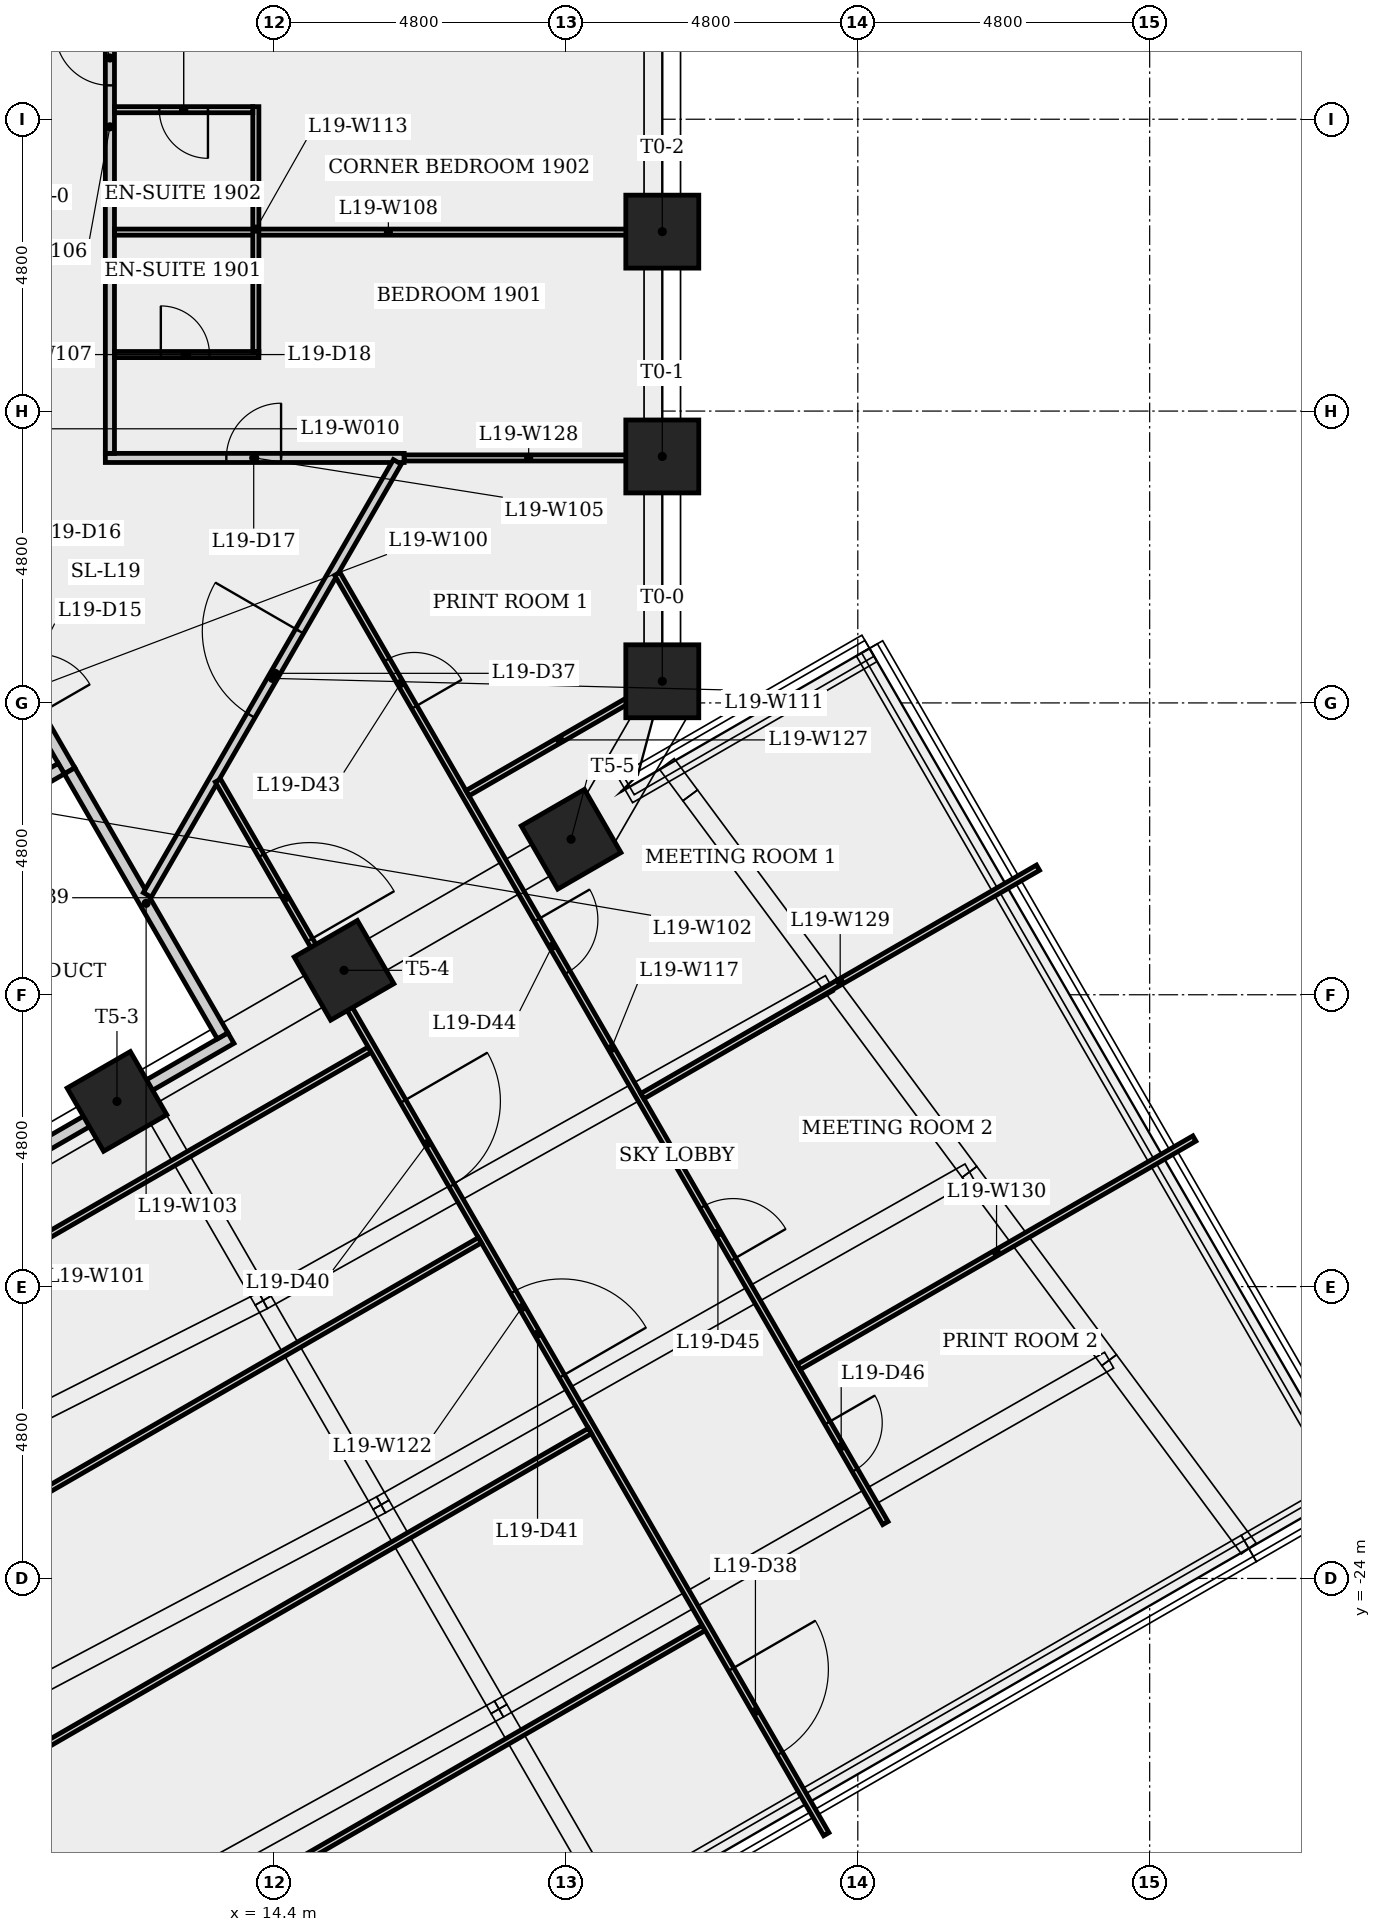
"""IFC4 building model, lengths in metres.
Left out: names, types, materials, properties, quantities, classifications, styles, units other than length and angle.
Written with IfcOpenShell. Run it as: python <this file> out.ifc"""

import sys

from ifc_helpers import new_model, si_unit, direction, frame, frame_2d, origin, origin_2d, place, context, subcontext, project, spatial, rectangle, extrude, element, fill, save


model = new_model("IFC4")
c1 = context("Model", 3, precision=1e-05, world=origin(), true_north=direction((0.0, 1.0)))
c2 = subcontext(c1, "Body", "Model", "MODEL_VIEW")
j1 = project(units=[si_unit("LENGTHUNIT", "METRE"), si_unit("PLANEANGLEUNIT", "RADIAN")], contexts=[c1])
p1 = place(None, origin())
s1 = spatial("IfcSite", under=j1, at=p1, CompositionType="ELEMENT")
p2 = place(p1, origin())
s2 = spatial("IfcBuilding", under=s1, at=p2, CompositionType="ELEMENT")
p3 = place(p2, frame((0.0, 0.0, 74.3)))
s3 = spatial("IfcBuildingStorey", under=s2, at=p3, CompositionType="ELEMENT", Elevation=74.3)
for number, where, z_axis, x_axis in (
    (1, (20.785, -9.244, 0.0), (0.0, 0.0, 1.0), (1.0, 0.0, 0.0)),
    (2, (20.785, -5.546, 0.0), (0.0, 0.0, 1.0), (1.0, 0.0, 0.0)),
    (3, (20.785, -1.849, 0.0), (0.0, 0.0, 1.0), (1.0, 0.0, 0.0)),
    (4, (11.816, -16.154, 0.0), (0.0, 0.0, 1.0), (0.5, -0.866, 0.0)),
    (5, (15.55, -13.998, 0.0), (0.0, 0.0, 1.0), (0.5, -0.866, 0.0)),
    (6, (19.285, -11.842, 0.0), (0.0, 0.0, 1.0), (0.5, -0.866, 0.0)),
):
    element("IfcColumn", number, at=place(p3, frame(where, z_axis=z_axis, x_axis=x_axis)), inside=s3, PredefinedType="COLUMN", context=c2, shape_type="SweptSolid", body=[
        extrude(rectangle(XDim=1.2, YDim=1.2, at=origin_2d()), origin(), (0.0, 0.0, 1.0), 4.0),
    ])
p4 = place(p3, frame((-2.938, -38.904, 0.0), z_axis=(0.0, 0.0, 1.0), x_axis=(0.866026157323, 0.49999869483, 0.0)))
e7 = element("IfcWall", 7, at=p4, inside=s3, PredefinedType="PARTITIONING", context=c2, shape_type="SweptSolid", body=[
    extrude(rectangle(XDim=28.179, YDim=0.1, at=frame_2d((14.089, 0.0))), origin(), (0.0, 0.0, 1.0), 3.6),
])
p5 = place(p4, frame((13.662, 0.0, 0.0)))
e8 = element("IfcOpeningElement", 8, at=p5, cuts=e7, PredefinedType="OPENING", context=c2, shape_type="SweptSolid", body=[
    extrude(rectangle(XDim=1.6, YDim=2.1, at=frame_2d((0.8, 1.05))), frame((0.0, 0.06, 0.0), z_axis=(0.0, -1.0, 0.0), x_axis=(1.0, 0.0, 0.0)), (0.0, 0.0, 1.0), 0.12),
])
p6 = place(p3, frame((9.537, -8.119, 0.0), z_axis=(0.0, 0.0, 1.0), x_axis=(0.499990139034, -0.866031096941, 0.0)))
e9 = element("IfcWall", 9, at=p6, inside=s3, PredefinedType="PARTITIONING", context=c2, shape_type="SweptSolid", body=[
    extrude(rectangle(XDim=3.0, YDim=0.2, at=frame_2d((1.5, 0.0))), origin(), (0.0, 0.0, 1.0), 3.6),
])
p7 = place(p6, frame((0.935, 0.0, 0.0)))
e10 = element("IfcOpeningElement", 10, at=p7, cuts=e9, PredefinedType="OPENING", context=c2, shape_type="SweptSolid", body=[
    extrude(rectangle(XDim=1.0, YDim=2.1, at=frame_2d((0.5, 1.05))), frame((0.0, 0.11, 0.0), z_axis=(0.0, -1.0, 0.0), x_axis=(1.0, 0.0, 0.0)), (0.0, 0.0, 1.0), 0.22),
])
p8 = place(p3, frame((5.896, -19.612, 0.0), z_axis=(0.0, 0.0, 1.0), x_axis=(0.866024315419, 0.5000018851, 0.0)))
e11 = element("IfcWall", 11, at=p8, inside=s3, PredefinedType="PLUMBINGWALL", context=c2, shape_type="SweptSolid", body=[
    extrude(rectangle(XDim=9.0, YDim=0.2, at=frame_2d((4.5, 0.0))), origin(), (0.0, 0.0, 1.0), 2.675),
])
p9 = place(p3, frame((10.901, -10.681, 0.0), z_axis=(0.0, 0.0, 1.0), x_axis=(-0.866007538022, -0.500030943131, 0.0)))
e12 = element("IfcWall", 12, at=p9, inside=s3, PredefinedType="PLUMBINGWALL", context=c2, shape_type="SweptSolid", body=[
    extrude(rectangle(XDim=2.375, YDim=0.2, at=frame_2d((1.188, 0.0))), origin(), (0.0, 0.0, 1.0), 3.6),
])
p10 = place(p3, frame((11.037, -10.717, 0.0), z_axis=(0.0, 0.0, 1.0), x_axis=(0.500005202617, -0.866022400031, 0.0)))
e13 = element("IfcWall", 13, at=p10, inside=s3, PredefinedType="PLUMBINGWALL", context=c2, shape_type="SweptSolid", body=[
    extrude(rectangle(XDim=5.033, YDim=0.2, at=frame_2d((2.516, 0.0))), origin(), (0.0, 0.0, 1.0), 3.6),
])
p11 = place(p3, frame((11.625, -5.571, 0.0), z_axis=(0.0, 0.0, 1.0), x_axis=(1.0, 0.0, 0.0)))
e14 = element("IfcWall", 14, at=p11, inside=s3, PredefinedType="PARTITIONING", context=c2, shape_type="SweptSolid", body=[
    extrude(rectangle(XDim=4.915, YDim=0.15, at=frame_2d((2.457, 0.0))), origin(), (0.0, 0.0, 1.0), 3.6),
])
p12 = place(p11, frame((1.99, 0.0, 0.0)))
e15 = element("IfcOpeningElement", 15, at=p12, cuts=e14, PredefinedType="OPENING", context=c2, shape_type="SweptSolid", body=[
    extrude(rectangle(XDim=0.9, YDim=2.1, at=frame_2d((0.45, 1.05))), frame((0.0, 0.085, 0.0), z_axis=(0.0, -1.0, 0.0), x_axis=(1.0, 0.0, 0.0)), (0.0, 0.0, 1.0), 0.17),
])
p13 = place(p3, frame((11.7, -5.496, 0.0), z_axis=(0.0, 0.0, 1.0), x_axis=(0.0, 1.0, 0.0)))
e16 = element("IfcWall", 16, at=p13, inside=s3, PredefinedType="PARTITIONING", context=c2, shape_type="SweptSolid", body=[
    extrude(rectangle(XDim=10.741, YDim=0.15, at=frame_2d((5.371, 0.0))), origin(), (0.0, 0.0, 1.0), 3.6),
])
p14 = place(p13, frame((6.052, 0.0, 0.0)))
e17 = element("IfcOpeningElement", 17, at=p14, cuts=e16, PredefinedType="OPENING", context=c2, shape_type="SweptSolid", body=[
    extrude(rectangle(XDim=0.9, YDim=2.1, at=frame_2d((0.45, 1.05))), frame((0.0, 0.085, 0.0), z_axis=(0.0, -1.0, 0.0), x_axis=(1.0, 0.0, 0.0)), (0.0, 0.0, 1.0), 0.17),
])
p15 = place(p3, frame((11.775, -3.871, 0.0), z_axis=(0.0, 0.0, 1.0), x_axis=(1.0, 0.0, 0.0)))
e18 = element("IfcWall", 18, at=p15, inside=s3, PredefinedType="PARTITIONING", context=c2, shape_type="SweptSolid", body=[
    extrude(rectangle(XDim=2.375, YDim=0.1, at=frame_2d((1.188, 0.0))), origin(), (0.0, 0.0, 1.0), 3.6),
])
p16 = place(p15, frame((0.762, 0.0, 0.0)))
e19 = element("IfcOpeningElement", 19, at=p16, cuts=e18, PredefinedType="OPENING", context=c2, shape_type="SweptSolid", body=[
    extrude(rectangle(XDim=0.8, YDim=2.1, at=frame_2d((0.4, 1.05))), frame((0.0, 0.06, 0.0), z_axis=(0.0, -1.0, 0.0), x_axis=(1.0, 0.0, 0.0)), (0.0, 0.0, 1.0), 0.12),
])
p17 = place(p3, frame((11.775, -1.857, 0.0), z_axis=(0.0, 0.0, 1.0), x_axis=(1.0, 0.0, 0.0)))
e20 = element("IfcWall", 20, at=p17, inside=s3, PredefinedType="PARTITIONING", context=c2, shape_type="SweptSolid", body=[
    extrude(rectangle(XDim=9.01, YDim=0.1, at=frame_2d((4.505, 0.0))), origin(), (0.0, 0.0, 1.0), 3.6),
])
p18 = place(p3, frame((12.315, -12.758, 0.0), z_axis=(0.0, 0.0, 1.0), x_axis=(0.499989712218, 0.866031343357, 0.0)))
e21 = element("IfcWall", 21, at=p18, inside=s3, PredefinedType="PARTITIONING", context=c2, shape_type="SweptSolid", body=[
    extrude(rectangle(XDim=8.224, YDim=0.15, at=frame_2d((4.112, 0.0))), origin(), (0.0, 0.0, 1.0), 3.6),
])
p19 = place(p18, frame((3.408, 0.0, 0.0)))
e22 = element("IfcOpeningElement", 22, at=p19, cuts=e21, PredefinedType="OPENING", context=c2, shape_type="SweptSolid", body=[
    extrude(rectangle(XDim=1.6, YDim=2.1, at=frame_2d((0.8, 1.05))), frame((0.0, 0.085, 0.0), z_axis=(0.0, -1.0, 0.0), x_axis=(1.0, 0.0, 0.0)), (0.0, 0.0, 1.0), 0.17),
])
p20 = place(p3, frame((14.1, -3.821, 0.0), z_axis=(0.0, 0.0, 1.0), x_axis=(0.0, 1.0, 0.0)))
e23 = element("IfcWall", 23, at=p20, inside=s3, PredefinedType="PARTITIONING", context=c2, shape_type="SweptSolid", body=[
    extrude(rectangle(XDim=4.027, YDim=0.1, at=frame_2d((2.014, 0.0))), origin(), (0.0, 0.0, 1.0), 3.6),
])
p21 = place(p3, frame((14.05, 0.157, 0.0), z_axis=(0.0, 0.0, 1.0), x_axis=(-1.0, 0.0, 0.0)))
e24 = element("IfcWall", 24, at=p21, inside=s3, PredefinedType="PARTITIONING", context=c2, shape_type="SweptSolid", body=[
    extrude(rectangle(XDim=2.275, YDim=0.1, at=frame_2d((1.138, 0.0))), origin(), (0.0, 0.0, 1.0), 3.6),
])
p22 = place(p21, frame((0.738, 0.0, 0.0)))
e25 = element("IfcOpeningElement", 25, at=p22, cuts=e24, PredefinedType="OPENING", context=c2, shape_type="SweptSolid", body=[
    extrude(rectangle(XDim=0.8, YDim=2.1, at=frame_2d((0.4, 1.05))), frame((0.0, 0.06, 0.0), z_axis=(0.0, -1.0, 0.0), x_axis=(1.0, 0.0, 0.0)), (0.0, 0.0, 1.0), 0.12),
])
p23 = place(p3, frame((15.439, -7.476, 0.0), z_axis=(0.0, 0.0, 1.0), x_axis=(0.499994416698, -0.866028627281, 0.0)))
e26 = element("IfcWall", 26, at=p23, inside=s3, PredefinedType="PARTITIONING", context=c2, shape_type="SweptSolid", body=[
    extrude(rectangle(XDim=18.028, YDim=0.1, at=frame_2d((9.014, 0.0))), origin(), (0.0, 0.0, 1.0), 3.6),
])
p24 = place(p23, frame((1.633, 0.0, 0.0)))
e27 = element("IfcOpeningElement", 27, at=p24, cuts=e26, PredefinedType="OPENING", context=c2, shape_type="SweptSolid", body=[
    extrude(rectangle(XDim=0.9, YDim=2.1, at=frame_2d((0.45, 1.05))), frame((0.0, 0.06, 0.0), z_axis=(0.0, -1.0, 0.0), x_axis=(1.0, 0.0, 0.0)), (0.0, 0.0, 1.0), 0.12),
])
p25 = place(p23, frame((6.572, 0.0, 0.0)))
e28 = element("IfcOpeningElement", 28, at=p25, cuts=e26, PredefinedType="OPENING", context=c2, shape_type="SweptSolid", body=[
    extrude(rectangle(XDim=1.0, YDim=2.1, at=frame_2d((0.5, 1.05))), frame((0.0, 0.06, 0.0), z_axis=(0.0, -1.0, 0.0), x_axis=(1.0, 0.0, 0.0)), (0.0, 0.0, 1.0), 0.12),
])
p26 = place(p23, frame((12.02, 0.0, 0.0)))
e29 = element("IfcOpeningElement", 29, at=p26, cuts=e26, PredefinedType="OPENING", context=c2, shape_type="SweptSolid", body=[
    extrude(rectangle(XDim=1.0, YDim=2.1, at=frame_2d((0.5, 1.05))), frame((0.0, 0.06, 0.0), z_axis=(0.0, -1.0, 0.0), x_axis=(1.0, 0.0, 0.0)), (0.0, 0.0, 1.0), 0.12),
])
p27 = place(p23, frame((16.125, 0.0, 0.0)))
e30 = element("IfcOpeningElement", 30, at=p27, cuts=e26, PredefinedType="OPENING", context=c2, shape_type="SweptSolid", body=[
    extrude(rectangle(XDim=0.9, YDim=2.1, at=frame_2d((0.45, 1.05))), frame((0.0, 0.06, 0.0), z_axis=(0.0, -1.0, 0.0), x_axis=(1.0, 0.0, 0.0)), (0.0, 0.0, 1.0), 0.12),
])
p28 = place(p3, frame((15.974, -15.302, 0.0), z_axis=(0.0, 0.0, 1.0), x_axis=(-0.866022405705, -0.500005192789, 0.0)))
e31 = element("IfcWall", 31, at=p28, inside=s3, PredefinedType="PARTITIONING", context=c2, shape_type="SweptSolid", body=[
    extrude(rectangle(XDim=28.179, YDim=0.1, at=frame_2d((14.089, 0.0))), origin(), (0.0, 0.0, 1.0), 3.6),
])
p29 = place(p3, frame((13.476, -10.876, 0.0), z_axis=(0.0, 0.0, 1.0), x_axis=(0.500008654708, -0.866020406929, 0.0)))
e32 = element("IfcWall", 32, at=p29, inside=s3, PredefinedType="PARTITIONING", context=c2, shape_type="SweptSolid", body=[
    extrude(rectangle(XDim=20.011, YDim=0.1, at=frame_2d((10.005, 0.0))), origin(), (0.0, 0.0, 1.0), 3.6),
])
p30 = place(p29, frame((16.88, 0.0, 0.0)))
e33 = element("IfcOpeningElement", 33, at=p30, cuts=e32, PredefinedType="OPENING", context=c2, shape_type="SweptSolid", body=[
    extrude(rectangle(XDim=1.6, YDim=2.1, at=frame_2d((0.8, 1.05))), frame((0.0, 0.06, 0.0), z_axis=(0.0, -1.0, 0.0), x_axis=(1.0, 0.0, 0.0)), (0.0, 0.0, 1.0), 0.12),
])
p31 = place(p29, frame((1.426, 0.0, 0.0)))
e34 = element("IfcOpeningElement", 34, at=p31, cuts=e32, PredefinedType="OPENING", context=c2, shape_type="SweptSolid", body=[
    extrude(rectangle(XDim=1.6, YDim=2.1, at=frame_2d((0.8, 1.05))), frame((0.0, 0.06, 0.0), z_axis=(0.0, -1.0, 0.0), x_axis=(1.0, 0.0, 0.0)), (0.0, 0.0, 1.0), 0.12),
])
p32 = place(p29, frame((6.092, 0.0, 0.0)))
e35 = element("IfcOpeningElement", 35, at=p32, cuts=e32, PredefinedType="OPENING", context=c2, shape_type="SweptSolid", body=[
    extrude(rectangle(XDim=1.6, YDim=2.1, at=frame_2d((0.8, 1.05))), frame((0.0, 0.06, 0.0), z_axis=(0.0, -1.0, 0.0), x_axis=(1.0, 0.0, 0.0)), (0.0, 0.0, 1.0), 0.12),
])
p33 = place(p29, frame((9.713, 0.0, 0.0)))
e36 = element("IfcOpeningElement", 36, at=p33, cuts=e32, PredefinedType="OPENING", context=c2, shape_type="SweptSolid", body=[
    extrude(rectangle(XDim=1.6, YDim=2.1, at=frame_2d((0.8, 1.05))), frame((0.0, 0.06, 0.0), z_axis=(0.0, -1.0, 0.0), x_axis=(1.0, 0.0, 0.0)), (0.0, 0.0, 1.0), 0.12),
])
for number, where, z_axis, x_axis in (
    (37, (17.784, -18.438, 0.0), (0.0, 0.0, 1.0), (-0.866, -0.5, 0.0)),
    (38, (19.595, -21.574, 0.0), (0.0, 0.0, 1.0), (-0.866, -0.5, 0.0)),
):
    element("IfcWall", number, at=place(p3, frame(where, z_axis=z_axis, x_axis=x_axis)), inside=s3, PredefinedType="PARTITIONING", context=c2, shape_type="SweptSolid", body=[
        extrude(rectangle(XDim=28.178, YDim=0.1, at=frame_2d((14.089, 0.0))), origin(), (0.0, 0.0, 1.0), 3.275),
    ])
p34 = place(p3, frame((20.616, -9.332, 0.0), z_axis=(0.0, 0.0, 1.0), x_axis=(-0.866005819648, -0.500033919186, 0.0)))
e39 = element("IfcWall", 39, at=p34, inside=s3, PredefinedType="PARTITIONING", context=c2, shape_type="SweptSolid", body=[
    extrude(rectangle(XDim=3.506, YDim=0.1, at=frame_2d((1.753, 0.0))), origin(), (0.0, 0.0, 1.0), 3.6),
])
p35 = place(p3, frame((20.635, -5.571, 0.0), z_axis=(0.0, 0.0, 1.0), x_axis=(-1.0, 0.0, 0.0)))
e40 = element("IfcWall", 40, at=p35, inside=s3, PredefinedType="PARTITIONING", context=c2, shape_type="SweptSolid", body=[
    extrude(rectangle(XDim=4.095, YDim=0.1, at=frame_2d((2.048, 0.0))), origin(), (0.0, 0.0, 1.0), 3.6),
])
p36 = place(p3, frame((26.964, -12.31, 0.0), z_axis=(0.0, 0.0, 1.0), x_axis=(-0.866032992878, -0.499986855073, 0.0)))
e41 = element("IfcWall", 41, at=p36, inside=s3, PredefinedType="PARTITIONING", context=c2, shape_type="SweptSolid", body=[
    extrude(rectangle(XDim=7.513, YDim=0.1, at=frame_2d((3.757, 0.0))), origin(), (0.0, 0.0, 1.0), 3.275),
])
p37 = place(p3, frame((29.535, -16.764, 0.0), z_axis=(0.0, 0.0, 1.0), x_axis=(-0.866032992878, -0.499986855073, 0.0)))
e42 = element("IfcWall", 42, at=p37, inside=s3, PredefinedType="PARTITIONING", context=c2, shape_type="SweptSolid", body=[
    extrude(rectangle(XDim=7.513, YDim=0.1, at=frame_2d((3.757, 0.0))), origin(), (0.0, 0.0, 1.0), 3.6),
])
p38 = place(p12, origin())
e43 = element("IfcDoor", 43, at=p38, inside=s3, OperationType="SINGLE_SWING_RIGHT", PredefinedType="DOOR", context=c2, shape_type="SweptSolid", body=[
    extrude(rectangle(XDim=0.9, YDim=2.1, at=frame_2d((0.45, 1.05))), frame((0.0, 0.025, 0.0), z_axis=(0.0, -1.0, 0.0), x_axis=(1.0, 0.0, 0.0)), (0.0, 0.0, 1.0), 0.05),
])
fill(e15, e43)
p39 = place(p16, origin())
e44 = element("IfcDoor", 44, at=p39, inside=s3, OperationType="SINGLE_SWING_LEFT", PredefinedType="DOOR", context=c2, shape_type="SweptSolid", body=[
    extrude(rectangle(XDim=0.8, YDim=2.1, at=frame_2d((0.4, 1.05))), frame((0.0, 0.025, 0.0), z_axis=(0.0, -1.0, 0.0), x_axis=(1.0, 0.0, 0.0)), (0.0, 0.0, 1.0), 0.05),
])
fill(e19, e44)
p40 = place(p14, origin())
e45 = element("IfcDoor", 45, at=p40, inside=s3, OperationType="SINGLE_SWING_RIGHT", PredefinedType="DOOR", context=c2, shape_type="SweptSolid", body=[
    extrude(rectangle(XDim=0.9, YDim=2.1, at=frame_2d((0.45, 1.05))), frame((0.0, 0.025, 0.0), z_axis=(0.0, -1.0, 0.0), x_axis=(1.0, 0.0, 0.0)), (0.0, 0.0, 1.0), 0.05),
])
fill(e17, e45)
p41 = place(p22, origin())
e46 = element("IfcDoor", 46, at=p41, inside=s3, OperationType="SINGLE_SWING_LEFT", PredefinedType="DOOR", context=c2, shape_type="SweptSolid", body=[
    extrude(rectangle(XDim=0.8, YDim=2.1, at=frame_2d((0.4, 1.05))), frame((0.0, 0.025, 0.0), z_axis=(0.0, -1.0, 0.0), x_axis=(1.0, 0.0, 0.0)), (0.0, 0.0, 1.0), 0.05),
])
fill(e25, e46)
p42 = place(p19, origin())
e47 = element("IfcDoor", 47, at=p42, inside=s3, OperationType="SINGLE_SWING_RIGHT", PredefinedType="DOOR", context=c2, shape_type="SweptSolid", body=[
    extrude(rectangle(XDim=1.6, YDim=2.1, at=frame_2d((0.8, 1.05))), frame((0.0, 0.025, 0.0), z_axis=(0.0, -1.0, 0.0), x_axis=(1.0, 0.0, 0.0)), (0.0, 0.0, 1.0), 0.05),
])
fill(e22, e47)
p43 = place(p30, origin())
e48 = element("IfcDoor", 48, at=p43, inside=s3, OperationType="SINGLE_SWING_LEFT", PredefinedType="DOOR", context=c2, shape_type="SweptSolid", body=[
    extrude(rectangle(XDim=1.6, YDim=2.1, at=frame_2d((0.8, 1.05))), frame((0.0, 0.025, 0.0), z_axis=(0.0, -1.0, 0.0), x_axis=(1.0, 0.0, 0.0)), (0.0, 0.0, 1.0), 0.05),
])
fill(e33, e48)
p44 = place(p31, origin())
e49 = element("IfcDoor", 49, at=p44, inside=s3, OperationType="SINGLE_SWING_RIGHT", PredefinedType="DOOR", context=c2, shape_type="SweptSolid", body=[
    extrude(rectangle(XDim=1.6, YDim=2.1, at=frame_2d((0.8, 1.05))), frame((0.0, 0.025, 0.0), z_axis=(0.0, -1.0, 0.0), x_axis=(1.0, 0.0, 0.0)), (0.0, 0.0, 1.0), 0.05),
])
fill(e34, e49)
p45 = place(p32, origin())
e50 = element("IfcDoor", 50, at=p45, inside=s3, OperationType="SINGLE_SWING_LEFT", PredefinedType="DOOR", context=c2, shape_type="SweptSolid", body=[
    extrude(rectangle(XDim=1.6, YDim=2.1, at=frame_2d((0.8, 1.05))), frame((0.0, 0.025, 0.0), z_axis=(0.0, -1.0, 0.0), x_axis=(1.0, 0.0, 0.0)), (0.0, 0.0, 1.0), 0.05),
])
fill(e35, e50)
p46 = place(p33, origin())
e51 = element("IfcDoor", 51, at=p46, inside=s3, OperationType="SINGLE_SWING_RIGHT", PredefinedType="DOOR", context=c2, shape_type="SweptSolid", body=[
    extrude(rectangle(XDim=1.6, YDim=2.1, at=frame_2d((0.8, 1.05))), frame((0.0, 0.025, 0.0), z_axis=(0.0, -1.0, 0.0), x_axis=(1.0, 0.0, 0.0)), (0.0, 0.0, 1.0), 0.05),
])
fill(e36, e51)
p47 = place(p24, origin())
e52 = element("IfcDoor", 52, at=p47, inside=s3, OperationType="SINGLE_SWING_RIGHT", PredefinedType="DOOR", context=c2, shape_type="SweptSolid", body=[
    extrude(rectangle(XDim=0.9, YDim=2.1, at=frame_2d((0.45, 1.05))), frame((0.0, 0.025, 0.0), z_axis=(0.0, -1.0, 0.0), x_axis=(1.0, 0.0, 0.0)), (0.0, 0.0, 1.0), 0.05),
])
fill(e27, e52)
p48 = place(p25, origin())
e53 = element("IfcDoor", 53, at=p48, inside=s3, OperationType="SINGLE_SWING_LEFT", PredefinedType="DOOR", context=c2, shape_type="SweptSolid", body=[
    extrude(rectangle(XDim=1.0, YDim=2.1, at=frame_2d((0.5, 1.05))), frame((0.0, 0.025, 0.0), z_axis=(0.0, -1.0, 0.0), x_axis=(1.0, 0.0, 0.0)), (0.0, 0.0, 1.0), 0.05),
])
fill(e28, e53)
p49 = place(p26, origin())
e54 = element("IfcDoor", 54, at=p49, inside=s3, OperationType="SINGLE_SWING_RIGHT", PredefinedType="DOOR", context=c2, shape_type="SweptSolid", body=[
    extrude(rectangle(XDim=1.0, YDim=2.1, at=frame_2d((0.5, 1.05))), frame((0.0, 0.025, 0.0), z_axis=(0.0, -1.0, 0.0), x_axis=(1.0, 0.0, 0.0)), (0.0, 0.0, 1.0), 0.05),
])
fill(e29, e54)
p50 = place(p27, origin())
e55 = element("IfcDoor", 55, at=p50, inside=s3, OperationType="SINGLE_SWING_LEFT", PredefinedType="DOOR", context=c2, shape_type="SweptSolid", body=[
    extrude(rectangle(XDim=0.9, YDim=2.1, at=frame_2d((0.45, 1.05))), frame((0.0, 0.025, 0.0), z_axis=(0.0, -1.0, 0.0), x_axis=(1.0, 0.0, 0.0)), (0.0, 0.0, 1.0), 0.05),
])
fill(e30, e55)
save(model, sys.argv[1])
